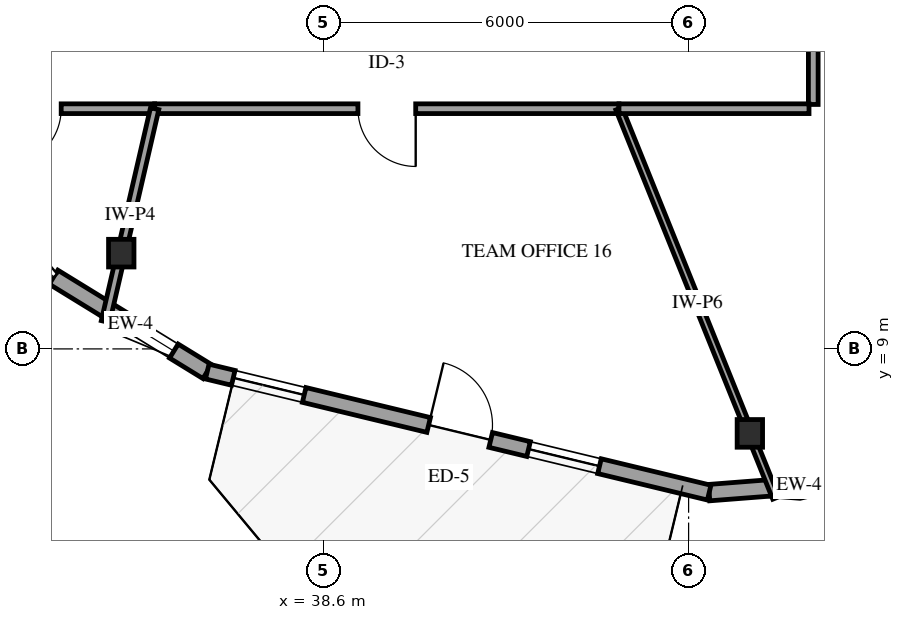
"""IFC4 building model, lengths in metres.
Left out: names, types, materials, properties, quantities, classifications, styles, units other than length and angle.
Written with IfcOpenShell. Run it as: python <this file> out.ifc"""

import sys

from ifc_helpers import new_model, si_unit, direction, frame, frame_2d, origin, origin_2d, place, context, subcontext, project, spatial, rectangle, i_section, extrude, element, fill, save


model = new_model("IFC4")
c1 = context("Model", 3, precision=1e-05, world=origin(), true_north=direction((0.0, 1.0)))
c2 = subcontext(c1, "Body", "Model", "MODEL_VIEW")
j1 = project(units=[si_unit("LENGTHUNIT", "METRE"), si_unit("PLANEANGLEUNIT", "RADIAN")], contexts=[c1])
p1 = place(None, origin())
s1 = spatial("IfcSite", under=j1, at=p1, CompositionType="ELEMENT")
p2 = place(p1, origin())
s2 = spatial("IfcBuilding", under=s1, at=p2, CompositionType="ELEMENT")
p3 = place(p2, frame((0.0, 0.0, 114.7)))
s3 = spatial("IfcBuildingStorey", under=s2, at=p3, CompositionType="ELEMENT", Elevation=114.7)
for number, where, z_axis, x_axis in (
    (1, (35.27, 10.575, 0.0), (0.0, 0.0, 1.0), (1.0, 0.0, 0.0)),
    (2, (45.607, 7.611, 0.0), (0.0, 0.0, 1.0), (1.0, 0.0, 0.0)),
):
    element("IfcColumn", number, at=place(p3, frame(where, z_axis=z_axis, x_axis=x_axis)), inside=s3, PredefinedType="COLUMN", context=c2, shape_type="SweptSolid", body=[
        extrude(i_section(OverallWidth=0.418, OverallDepth=0.455, WebThickness=0.042, FlangeThickness=0.068, FilletRadius=0.038, at=origin_2d()), origin(), (0.0, 0.0, 1.0), 3.9),
    ])
p4 = place(p3, frame((34.156, 10.18, 0.0), z_axis=(0.0, 0.0, 1.0), x_axis=(0.852087521371, -0.523399327402, 0.0)))
e3 = element("IfcWall", 3, at=p4, inside=s3, PredefinedType="SOLIDWALL", context=c2, shape_type="SweptSolid", body=[
    extrude(rectangle(XDim=2.967, YDim=0.27, at=frame_2d((1.483, 0.0))), origin(), (0.0, 0.0, 1.0), 2.979),
])
p5 = place(p4, frame((1.422, 0.0, 0.75)))
e4 = element("IfcOpeningElement", 4, at=p5, cuts=e3, PredefinedType="OPENING", context=c2, shape_type="SweptSolid", body=[
    extrude(rectangle(XDim=0.9, YDim=1.5, at=frame_2d((0.45, 0.75))), frame((0.0, 0.145, 0.0), z_axis=(0.0, -1.0, 0.0), x_axis=(1.0, 0.0, 0.0)), (0.0, 0.0, 1.0), 0.29),
])
p6 = place(p3, frame((44.938, 6.636, 0.0), z_axis=(0.0, 0.0, 1.0), x_axis=(0.99699708695, 0.077439063873, 0.0)))
e5 = element("IfcWall", 5, at=p6, inside=s3, PredefinedType="SOLIDWALL", context=c2, shape_type="SweptSolid", body=[
    extrude(rectangle(XDim=2.967, YDim=0.27, at=frame_2d((1.483, 0.0))), origin(), (0.0, 0.0, 1.0), 2.979),
])
p7 = place(p6, frame((1.325, 0.0, 0.75)))
e6 = element("IfcOpeningElement", 6, at=p7, cuts=e5, PredefinedType="OPENING", context=c2, shape_type="SweptSolid", body=[
    extrude(rectangle(XDim=0.9, YDim=1.5, at=frame_2d((0.45, 0.75))), frame((0.0, 0.145, 0.0), z_axis=(0.0, -1.0, 0.0), x_axis=(1.0, 0.0, 0.0)), (0.0, 0.0, 1.0), 0.29),
])
p8 = place(p3, frame((36.684, 8.627, 0.0), z_axis=(0.0, 0.0, 1.0), x_axis=(0.972125162173, -0.234462511014, 0.0)))
e7 = element("IfcWall", 7, at=p8, inside=s3, PredefinedType="SOLIDWALL", context=c2, shape_type="SweptSolid", body=[
    extrude(rectangle(XDim=8.49, YDim=0.25, at=frame_2d((4.245, 0.0))), origin(), (0.0, 0.0, 1.0), 2.979),
])
p9 = place(p8, frame((3.745, 0.0, 0.0)))
e8 = element("IfcOpeningElement", 8, at=p9, cuts=e7, PredefinedType="OPENING", context=c2, shape_type="SweptSolid", body=[
    extrude(rectangle(XDim=1.05, YDim=2.15, at=frame_2d((0.525, 1.075))), frame((0.0, 0.135, 0.0), z_axis=(0.0, -1.0, 0.0), x_axis=(1.0, 0.0, 0.0)), (0.0, 0.0, 1.0), 0.27),
])
p10 = place(p8, frame((0.44, 0.0, 0.72)))
e9 = element("IfcOpeningElement", 9, at=p10, cuts=e7, PredefinedType="OPENING", context=c2, shape_type="SweptSolid", body=[
    extrude(rectangle(XDim=1.2, YDim=1.6, at=frame_2d((0.6, 0.8))), frame((0.0, 0.135, 0.0), z_axis=(0.0, -1.0, 0.0), x_axis=(1.0, 0.0, 0.0)), (0.0, 0.0, 1.0), 0.27),
])
p11 = place(p8, frame((5.435, 0.0, 0.72)))
e10 = element("IfcOpeningElement", 10, at=p11, cuts=e7, PredefinedType="OPENING", context=c2, shape_type="SweptSolid", body=[
    extrude(rectangle(XDim=1.2, YDim=1.6, at=frame_2d((0.6, 0.8))), frame((0.0, 0.135, 0.0), z_axis=(0.0, -1.0, 0.0), x_axis=(1.0, 0.0, 0.0)), (0.0, 0.0, 1.0), 0.27),
])
p12 = place(p3, frame((46.65, 23.33, 0.0), z_axis=(0.0, 0.0, 1.0), x_axis=(0.0, -1.0, 0.0)))
e11 = element("IfcWall", 11, at=p12, inside=s3, PredefinedType="PARTITIONING", context=c2, shape_type="SweptSolid", body=[
    extrude(rectangle(XDim=10.31, YDim=0.16, at=frame_2d((5.155, 0.0))), origin(), (0.0, 0.0, 1.0), 3.6),
])
p13 = place(p12, frame((4.68, 0.0, 0.0)))
e12 = element("IfcOpeningElement", 12, at=p13, cuts=e11, PredefinedType="OPENING", context=c2, shape_type="SweptSolid", body=[
    extrude(rectangle(XDim=0.95, YDim=2.15, at=frame_2d((0.475, 1.075))), frame((0.0, 0.09, 0.0), z_axis=(0.0, -1.0, 0.0), x_axis=(1.0, 0.0, 0.0)), (0.0, 0.0, 1.0), 0.18),
])
p14 = place(p3, frame((43.455, 12.95, 0.0), z_axis=(0.0, 0.0, 1.0), x_axis=(-1.0, 0.0, 0.0)))
e13 = element("IfcWall", 13, at=p14, inside=s3, PredefinedType="PARTITIONING", context=c2, shape_type="SweptSolid", body=[
    extrude(rectangle(XDim=7.636, YDim=0.16, at=frame_2d((3.818, 0.0))), origin(), (0.0, 0.0, 1.0), 3.6),
])
p15 = place(p14, frame((3.343, 0.0, 0.0)))
e14 = element("IfcOpeningElement", 14, at=p15, cuts=e13, PredefinedType="OPENING", context=c2, shape_type="SweptSolid", body=[
    extrude(rectangle(XDim=0.95, YDim=2.15, at=frame_2d((0.475, 1.075))), frame((0.0, 0.09, 0.0), z_axis=(0.0, -1.0, 0.0), x_axis=(1.0, 0.0, 0.0)), (0.0, 0.0, 1.0), 0.18),
])
p16 = place(p3, frame((43.455, 12.95, 0.0), z_axis=(0.0, 0.0, 1.0), x_axis=(0.373823057067, -0.927500038817, 0.0)))
e15 = element("IfcWall", 15, at=p16, inside=s3, PredefinedType="PARTITIONING", context=c2, shape_type="SweptSolid", body=[
    extrude(rectangle(XDim=6.901, YDim=0.11, at=frame_2d((3.451, 0.0))), origin(), (0.0, 0.0, 1.0), 2.895),
])
p17 = place(p3, frame((35.819, 12.95, 0.0), z_axis=(0.0, 0.0, 1.0), x_axis=(-1.0, 0.0, 0.0)))
e16 = element("IfcWall", 16, at=p17, inside=s3, PredefinedType="PARTITIONING", context=c2, shape_type="SweptSolid", body=[
    extrude(rectangle(XDim=4.024, YDim=0.16, at=frame_2d((2.012, 0.0))), origin(), (0.0, 0.0, 1.0), 3.6),
])
p18 = place(p17, frame((1.537, 0.0, 0.0)))
e17 = element("IfcOpeningElement", 17, at=p18, cuts=e16, PredefinedType="OPENING", context=c2, shape_type="SweptSolid", body=[
    extrude(rectangle(XDim=0.95, YDim=2.15, at=frame_2d((0.475, 1.075))), frame((0.0, 0.09, 0.0), z_axis=(0.0, -1.0, 0.0), x_axis=(1.0, 0.0, 0.0)), (0.0, 0.0, 1.0), 0.18),
])
p19 = place(p3, frame((35.819, 12.95, 0.0), z_axis=(0.0, 0.0, 1.0), x_axis=(-0.225167153037, -0.974320149229, 0.0)))
e18 = element("IfcWall", 18, at=p19, inside=s3, PredefinedType="PARTITIONING", context=c2, shape_type="SweptSolid", body=[
    extrude(rectangle(XDim=3.593, YDim=0.14, at=frame_2d((1.797, 0.0))), origin(), (0.0, 0.0, 1.0), 2.895),
])
p20 = place(p3, frame((46.58, 12.95, 0.0), z_axis=(0.0, 0.0, 1.0), x_axis=(-1.0, 0.0, 0.0)))
e19 = element("IfcWall", 19, at=p20, inside=s3, PredefinedType="PARTITIONING", context=c2, shape_type="SweptSolid", body=[
    extrude(rectangle(XDim=3.125, YDim=0.16, at=frame_2d((1.562, 0.0))), origin(), (0.0, 0.0, 1.0), 3.6),
])
p21 = place(p5, origin())
e20 = element("IfcWindow", 20, at=p21, inside=s3, PartitioningType="SINGLE_PANEL", PredefinedType="WINDOW", context=c2, shape_type="SweptSolid", body=[
    extrude(rectangle(XDim=0.9, YDim=1.5, at=frame_2d((0.45, 0.75))), frame((0.0, 0.03, 0.0), z_axis=(0.0, -1.0, 0.0), x_axis=(1.0, 0.0, 0.0)), (0.0, 0.0, 1.0), 0.06),
])
fill(e4, e20)
p22 = place(p7, origin())
e21 = element("IfcWindow", 21, at=p22, inside=s3, PartitioningType="SINGLE_PANEL", PredefinedType="WINDOW", context=c2, shape_type="SweptSolid", body=[
    extrude(rectangle(XDim=0.9, YDim=1.5, at=frame_2d((0.45, 0.75))), frame((0.0, 0.03, 0.0), z_axis=(0.0, -1.0, 0.0), x_axis=(1.0, 0.0, 0.0)), (0.0, 0.0, 1.0), 0.06),
])
fill(e6, e21)
p23 = place(p9, origin())
e22 = element("IfcDoor", 22, at=p23, inside=s3, OperationType="SINGLE_SWING_LEFT", PredefinedType="DOOR", context=c2, shape_type="SweptSolid", body=[
    extrude(rectangle(XDim=1.05, YDim=2.15, at=frame_2d((0.525, 1.075))), frame((0.0, 0.025, 0.0), z_axis=(0.0, -1.0, 0.0), x_axis=(1.0, 0.0, 0.0)), (0.0, 0.0, 1.0), 0.05),
])
fill(e8, e22)
p24 = place(p10, origin())
e23 = element("IfcWindow", 23, at=p24, inside=s3, PartitioningType="SINGLE_PANEL", PredefinedType="WINDOW", context=c2, shape_type="SweptSolid", body=[
    extrude(rectangle(XDim=1.2, YDim=1.6, at=frame_2d((0.6, 0.8))), frame((0.0, 0.03, 0.0), z_axis=(0.0, -1.0, 0.0), x_axis=(1.0, 0.0, 0.0)), (0.0, 0.0, 1.0), 0.06),
])
fill(e9, e23)
p25 = place(p11, origin())
e24 = element("IfcWindow", 24, at=p25, inside=s3, PartitioningType="SINGLE_PANEL", PredefinedType="WINDOW", context=c2, shape_type="SweptSolid", body=[
    extrude(rectangle(XDim=1.2, YDim=1.6, at=frame_2d((0.6, 0.8))), frame((0.0, 0.03, 0.0), z_axis=(0.0, -1.0, 0.0), x_axis=(1.0, 0.0, 0.0)), (0.0, 0.0, 1.0), 0.06),
])
fill(e10, e24)
p26 = place(p15, origin())
e25 = element("IfcDoor", 25, at=p26, inside=s3, OperationType="SINGLE_SWING_LEFT", PredefinedType="DOOR", context=c2, shape_type="SweptSolid", body=[
    extrude(rectangle(XDim=0.95, YDim=2.15, at=frame_2d((0.475, 1.075))), frame((0.0, 0.025, 0.0), z_axis=(0.0, -1.0, 0.0), x_axis=(1.0, 0.0, 0.0)), (0.0, 0.0, 1.0), 0.05),
])
fill(e14, e25)
p27 = place(p18, origin())
e26 = element("IfcDoor", 26, at=p27, inside=s3, OperationType="SINGLE_SWING_RIGHT", PredefinedType="DOOR", context=c2, shape_type="SweptSolid", body=[
    extrude(rectangle(XDim=0.95, YDim=2.15, at=frame_2d((0.475, 1.075))), frame((0.0, 0.025, 0.0), z_axis=(0.0, -1.0, 0.0), x_axis=(1.0, 0.0, 0.0)), (0.0, 0.0, 1.0), 0.05),
])
fill(e17, e26)
save(model, sys.argv[1])
